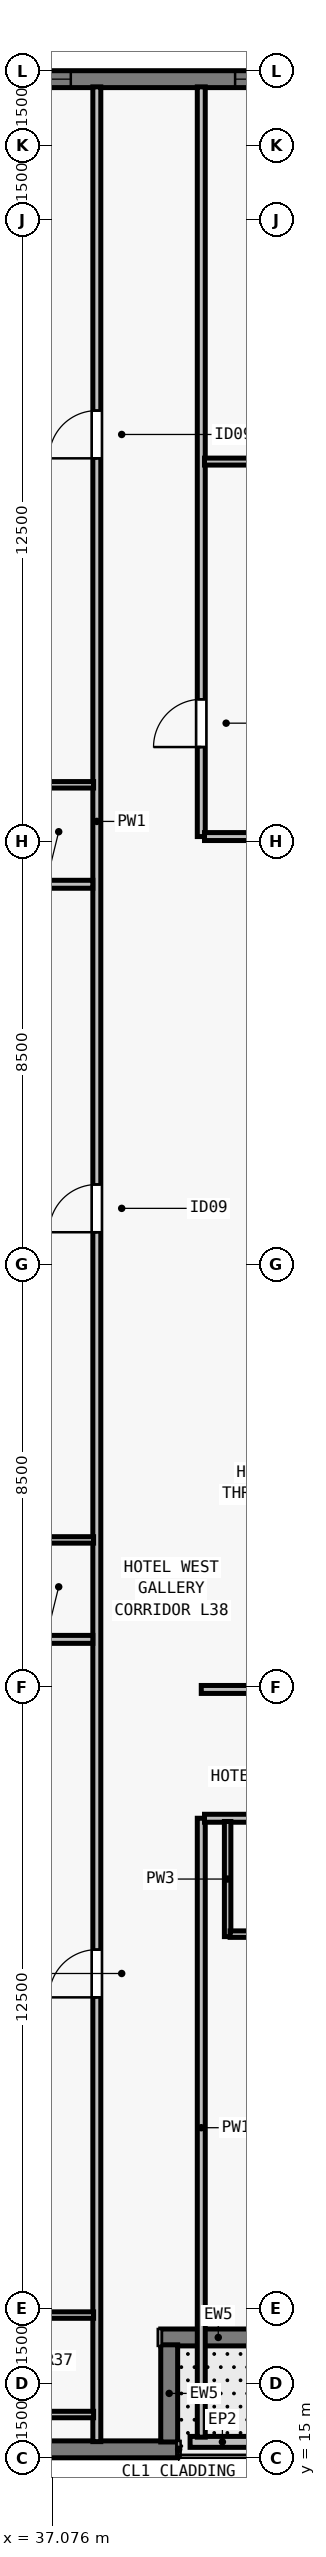
"""IFC4 building model, lengths in metres.
Left out: names, types, materials, properties, quantities, classifications, styles, units other than length and angle.
Written with IfcOpenShell. Run it as: python <this file> out.ifc"""

import sys

from ifc_helpers import new_model, si_unit, direction, frame, frame_2d, origin, place, context, subcontext, project, spatial, rectangle, extrude, element, fill, save


model = new_model("IFC4")
c1 = context("Model", 3, precision=1e-05, world=origin(), true_north=direction((0.0, 1.0)))
c2 = subcontext(c1, "Body", "Model", "MODEL_VIEW")
j1 = project(units=[si_unit("LENGTHUNIT", "METRE"), si_unit("PLANEANGLEUNIT", "RADIAN")], contexts=[c1])
p1 = place(None, origin())
s1 = spatial("IfcSite", under=j1, at=p1, CompositionType="ELEMENT")
p2 = place(p1, origin())
s2 = spatial("IfcBuilding", under=s1, at=p2, CompositionType="ELEMENT")
p3 = place(p2, frame((0.0, 0.0, 141.0)))
s3 = spatial("IfcBuildingStorey", under=s2, at=p3, CompositionType="ELEMENT", Elevation=141.0)
p4 = place(p3, frame((39.6, 15.17, 0.0), z_axis=(0.0, 0.0, 1.0), x_axis=(-1.0, 0.0, 0.0)))
e1 = element("IfcWall", 1, at=p4, inside=s3, PredefinedType="SOLIDWALL", context=c2, shape_type="SweptSolid", body=[
    extrude(rectangle(XDim=7.282, YDim=0.34, at=frame_2d((3.641, 0.0))), origin(), (0.0, 0.0, 1.0), 3.28),
])
p5 = place(p3, frame((32.0, 62.83, 0.0), z_axis=(0.0, 0.0, 1.0), x_axis=(1.0, 0.0, 0.0)))
e2 = element("IfcWall", 2, at=p5, inside=s3, PredefinedType="SOLIDWALL", context=c2, shape_type="SweptSolid", body=[
    extrude(rectangle(XDim=39.682, YDim=0.34, at=frame_2d((19.841, 0.0))), origin(), (0.0, 0.0, 1.0), 3.28),
])
p6 = place(p5, frame((4.102, 0.0, 0.8)))
e3 = element("IfcOpeningElement", 3, at=p6, cuts=e2, PredefinedType="OPENING", context=c2, shape_type="SweptSolid", body=[
    extrude(rectangle(XDim=1.35, YDim=1.66, at=frame_2d((0.675, 0.83))), frame((0.0, 0.18, 0.0), z_axis=(0.0, -1.0, 0.0), x_axis=(1.0, 0.0, 0.0)), (0.0, 0.0, 1.0), 0.36),
])
p7 = place(p5, frame((8.755, 0.0, 0.8)))
e4 = element("IfcOpeningElement", 4, at=p7, cuts=e2, PredefinedType="OPENING", context=c2, shape_type="SweptSolid", body=[
    extrude(rectangle(XDim=1.75, YDim=1.66, at=frame_2d((0.875, 0.83))), frame((0.0, 0.18, 0.0), z_axis=(0.0, -1.0, 0.0), x_axis=(1.0, 0.0, 0.0)), (0.0, 0.0, 1.0), 0.36),
])
p8 = place(p5, frame((12.059, 0.0, 0.8)))
e5 = element("IfcOpeningElement", 5, at=p8, cuts=e2, PredefinedType="OPENING", context=c2, shape_type="SweptSolid", body=[
    extrude(rectangle(XDim=1.35, YDim=1.66, at=frame_2d((0.675, 0.83))), frame((0.0, 0.18, 0.0), z_axis=(0.0, -1.0, 0.0), x_axis=(1.0, 0.0, 0.0)), (0.0, 0.0, 1.0), 0.36),
])
p9 = place(p5, frame((16.262, 0.0, 0.8)))
e6 = element("IfcOpeningElement", 6, at=p9, cuts=e2, PredefinedType="OPENING", context=c2, shape_type="SweptSolid", body=[
    extrude(rectangle(XDim=1.75, YDim=1.66, at=frame_2d((0.875, 0.83))), frame((0.0, 0.18, 0.0), z_axis=(0.0, -1.0, 0.0), x_axis=(1.0, 0.0, 0.0)), (0.0, 0.0, 1.0), 0.36),
])
p10 = place(p5, frame((18.316, 0.0, 0.8)))
e7 = element("IfcOpeningElement", 7, at=p10, cuts=e2, PredefinedType="OPENING", context=c2, shape_type="SweptSolid", body=[
    extrude(rectangle(XDim=1.35, YDim=1.66, at=frame_2d((0.675, 0.83))), frame((0.0, 0.18, 0.0), z_axis=(0.0, -1.0, 0.0), x_axis=(1.0, 0.0, 0.0)), (0.0, 0.0, 1.0), 0.36),
])
p11 = place(p5, frame((22.07, 0.0, 0.8)))
e8 = element("IfcOpeningElement", 8, at=p11, cuts=e2, PredefinedType="OPENING", context=c2, shape_type="SweptSolid", body=[
    extrude(rectangle(XDim=1.75, YDim=1.66, at=frame_2d((0.875, 0.83))), frame((0.0, 0.18, 0.0), z_axis=(0.0, -1.0, 0.0), x_axis=(1.0, 0.0, 0.0)), (0.0, 0.0, 1.0), 0.36),
])
p12 = place(p5, frame((26.273, 0.0, 0.8)))
e9 = element("IfcOpeningElement", 9, at=p12, cuts=e2, PredefinedType="OPENING", context=c2, shape_type="SweptSolid", body=[
    extrude(rectangle(XDim=1.35, YDim=1.66, at=frame_2d((0.675, 0.83))), frame((0.0, 0.18, 0.0), z_axis=(0.0, -1.0, 0.0), x_axis=(1.0, 0.0, 0.0)), (0.0, 0.0, 1.0), 0.36),
])
p13 = place(p5, frame((33.38, 0.0, 0.8)))
e10 = element("IfcOpeningElement", 10, at=p13, cuts=e2, PredefinedType="OPENING", context=c2, shape_type="SweptSolid", body=[
    extrude(rectangle(XDim=1.35, YDim=1.66, at=frame_2d((0.675, 0.83))), frame((0.0, 0.18, 0.0), z_axis=(0.0, -1.0, 0.0), x_axis=(1.0, 0.0, 0.0)), (0.0, 0.0, 1.0), 0.36),
])
p14 = place(p3, frame((45.022, 17.42, 0.0), z_axis=(0.0, 0.0, 1.0), x_axis=(-1.0, 0.0, 0.0)))
e11 = element("IfcWall", 11, at=p14, inside=s3, PredefinedType="SOLIDWALL", context=c2, shape_type="SweptSolid", body=[
    extrude(rectangle(XDim=5.762, YDim=0.34, at=frame_2d((2.881, 0.0))), origin(), (0.0, 0.0, 1.0), 3.28),
])
p15 = place(p14, frame((2.299, 0.0, 0.0)))
e12 = element("IfcOpeningElement", 12, at=p15, cuts=e11, PredefinedType="OPENING", context=c2, shape_type="SweptSolid", body=[
    extrude(rectangle(XDim=1.0, YDim=2.15, at=frame_2d((0.5, 1.075))), frame((0.0, 0.18, 0.0), z_axis=(0.0, -1.0, 0.0), x_axis=(1.0, 0.0, 0.0)), (0.0, 0.0, 1.0), 0.36),
])
p16 = place(p3, frame((39.43, 17.272, 0.0), z_axis=(0.0, 0.0, 1.0), x_axis=(0.0, -1.0, 0.0)))
e13 = element("IfcWall", 13, at=p16, inside=s3, PredefinedType="SOLIDWALL", context=c2, shape_type="SweptSolid", body=[
    extrude(rectangle(XDim=1.954, YDim=0.34, at=frame_2d((0.977, 0.0))), origin(), (0.0, 0.0, 1.0), 3.28),
])
p17 = place(p3, frame((39.85, 15.32, 0.0), z_axis=(0.0, 0.0, 1.0), x_axis=(1.0, 0.0, 0.0)))
e14 = element("IfcWall", 14, at=p17, inside=s3, PredefinedType="PARAPET", context=c2, shape_type="SweptSolid", body=[
    extrude(rectangle(XDim=1.3, YDim=0.22, at=frame_2d((0.65, 0.0))), origin(), (0.0, 0.0, 1.0), 0.55),
])
p18 = place(p3, frame((37.975, 15.325, 0.0), z_axis=(0.0, 0.0, 1.0), x_axis=(0.0, 1.0, 0.0)))
e15 = element("IfcWall", 15, at=p18, inside=s3, PredefinedType="PARTITIONING", context=c2, shape_type="SweptSolid", body=[
    extrude(rectangle(XDim=47.35, YDim=0.16, at=frame_2d((23.675, 0.0))), origin(), (0.0, 0.0, 1.0), 2.555),
])
p19 = place(p18, frame((8.934, 0.0, 0.0)))
e16 = element("IfcOpeningElement", 16, at=p19, cuts=e15, PredefinedType="OPENING", context=c2, shape_type="SweptSolid", body=[
    extrude(rectangle(XDim=0.96, YDim=2.15, at=frame_2d((0.48, 1.075))), frame((0.0, 0.09, 0.0), z_axis=(0.0, -1.0, 0.0), x_axis=(1.0, 0.0, 0.0)), (0.0, 0.0, 1.0), 0.18),
])
p20 = place(p18, frame((24.319, 0.0, 0.0)))
e17 = element("IfcOpeningElement", 17, at=p20, cuts=e15, PredefinedType="OPENING", context=c2, shape_type="SweptSolid", body=[
    extrude(rectangle(XDim=0.96, YDim=2.15, at=frame_2d((0.48, 1.075))), frame((0.0, 0.09, 0.0), z_axis=(0.0, -1.0, 0.0), x_axis=(1.0, 0.0, 0.0)), (0.0, 0.0, 1.0), 0.18),
])
p21 = place(p18, frame((39.88, 0.0, 0.0)))
e18 = element("IfcOpeningElement", 18, at=p21, cuts=e15, PredefinedType="OPENING", context=c2, shape_type="SweptSolid", body=[
    extrude(rectangle(XDim=0.96, YDim=2.15, at=frame_2d((0.48, 1.075))), frame((0.0, 0.09, 0.0), z_axis=(0.0, -1.0, 0.0), x_axis=(1.0, 0.0, 0.0)), (0.0, 0.0, 1.0), 0.18),
])
p22 = place(p3, frame((40.075, 15.415, 0.0), z_axis=(0.0, 0.0, 1.0), x_axis=(0.0, 1.0, 0.0)))
e19 = element("IfcWall", 19, at=p22, inside=s3, PredefinedType="PARTITIONING", context=c2, shape_type="SweptSolid", body=[
    extrude(rectangle(XDim=12.445, YDim=0.16, at=frame_2d((6.223, 0.0))), origin(), (0.0, 0.0, 1.0), 2.555),
])
p23 = place(p3, frame((40.075, 47.6, 0.0), z_axis=(0.0, 0.0, 1.0), x_axis=(0.0, 1.0, 0.0)))
e20 = element("IfcWall", 20, at=p23, inside=s3, PredefinedType="PARTITIONING", context=c2, shape_type="SweptSolid", body=[
    extrude(rectangle(XDim=15.075, YDim=0.16, at=frame_2d((7.538, 0.0))), origin(), (0.0, 0.0, 1.0), 2.555),
])
p24 = place(p23, frame((1.8, 0.0, 0.0)))
e21 = element("IfcOpeningElement", 21, at=p24, cuts=e20, PredefinedType="OPENING", context=c2, shape_type="SweptSolid", body=[
    extrude(rectangle(XDim=0.96, YDim=2.12, at=frame_2d((0.48, 1.06))), frame((0.0, 0.09, 0.0), z_axis=(0.0, -1.0, 0.0), x_axis=(1.0, 0.0, 0.0)), (0.0, 0.0, 1.0), 0.18),
])
p25 = place(p3, frame((40.075, 30.45, 0.0), z_axis=(0.0, 0.0, 1.0), x_axis=(1.0, 0.0, 0.0)))
e22 = element("IfcWall", 22, at=p25, inside=s3, PredefinedType="PARTITIONING", context=c2, shape_type="SweptSolid", body=[
    extrude(rectangle(XDim=3.16, YDim=0.16, at=frame_2d((1.58, 0.0))), origin(), (0.0, 0.0, 1.0), 3.28),
])
p26 = place(p3, frame((40.14, 47.6, 0.0), z_axis=(0.0, 0.0, 1.0), x_axis=(1.0, 0.0, 0.0)))
e23 = element("IfcWall", 23, at=p26, inside=s3, PredefinedType="PARTITIONING", context=c2, shape_type="SweptSolid", body=[
    extrude(rectangle(XDim=3.095, YDim=0.16, at=frame_2d((1.548, 0.0))), origin(), (0.0, 0.0, 1.0), 3.28),
])
p27 = place(p3, frame((40.14, 27.86, 0.0), z_axis=(0.0, 0.0, 1.0), x_axis=(1.0, 0.0, 0.0)))
e24 = element("IfcWall", 24, at=p27, inside=s3, PredefinedType="PARTITIONING", context=c2, shape_type="SweptSolid", body=[
    extrude(rectangle(XDim=22.07, YDim=0.16, at=frame_2d((11.035, 0.0))), origin(), (0.0, 0.0, 1.0), 3.28),
])
p28 = place(p27, frame((3.834, 0.0, 0.0)))
e25 = element("IfcOpeningElement", 25, at=p28, cuts=e24, PredefinedType="OPENING", context=c2, shape_type="SweptSolid", body=[
    extrude(rectangle(XDim=0.96, YDim=2.15, at=frame_2d((0.48, 1.075))), frame((0.0, 0.09, 0.0), z_axis=(0.0, -1.0, 0.0), x_axis=(1.0, 0.0, 0.0)), (0.0, 0.0, 1.0), 0.18),
])
p29 = place(p27, frame((8.746, 0.0, 0.0)))
e26 = element("IfcOpeningElement", 26, at=p29, cuts=e24, PredefinedType="OPENING", context=c2, shape_type="SweptSolid", body=[
    extrude(rectangle(XDim=0.96, YDim=2.15, at=frame_2d((0.48, 1.075))), frame((0.0, 0.09, 0.0), z_axis=(0.0, -1.0, 0.0), x_axis=(1.0, 0.0, 0.0)), (0.0, 0.0, 1.0), 0.18),
])
p30 = place(p27, frame((14.46, 0.0, 0.0)))
e27 = element("IfcOpeningElement", 27, at=p30, cuts=e24, PredefinedType="OPENING", context=c2, shape_type="SweptSolid", body=[
    extrude(rectangle(XDim=0.96, YDim=2.15, at=frame_2d((0.48, 1.075))), frame((0.0, 0.09, 0.0), z_axis=(0.0, -1.0, 0.0), x_axis=(1.0, 0.0, 0.0)), (0.0, 0.0, 1.0), 0.18),
])
p31 = place(p27, frame((19.993, 0.0, 0.0)))
e28 = element("IfcOpeningElement", 28, at=p31, cuts=e24, PredefinedType="OPENING", context=c2, shape_type="SweptSolid", body=[
    extrude(rectangle(XDim=0.96, YDim=2.15, at=frame_2d((0.48, 1.075))), frame((0.0, 0.09, 0.0), z_axis=(0.0, -1.0, 0.0), x_axis=(1.0, 0.0, 0.0)), (0.0, 0.0, 1.0), 0.18),
])
p32 = place(p3, frame((40.14, 55.14, 0.0), z_axis=(0.0, 0.0, 1.0), x_axis=(1.0, 0.0, 0.0)))
e29 = element("IfcWall", 29, at=p32, inside=s3, PredefinedType="PARTITIONING", context=c2, shape_type="SweptSolid", body=[
    extrude(rectangle(XDim=22.07, YDim=0.14, at=frame_2d((11.035, 0.0))), origin(), (0.0, 0.0, 1.0), 3.28),
])
p33 = place(p32, frame((3.435, 0.0, 0.0)))
e30 = element("IfcOpeningElement", 30, at=p33, cuts=e29, PredefinedType="OPENING", context=c2, shape_type="SweptSolid", body=[
    extrude(rectangle(XDim=0.92, YDim=2.12, at=frame_2d((0.46, 1.06))), frame((0.0, 0.08, 0.0), z_axis=(0.0, -1.0, 0.0), x_axis=(1.0, 0.0, 0.0)), (0.0, 0.0, 1.0), 0.16),
])
p34 = place(p32, frame((14.435, 0.0, 0.0)))
e31 = element("IfcOpeningElement", 31, at=p34, cuts=e29, PredefinedType="OPENING", context=c2, shape_type="SweptSolid", body=[
    extrude(rectangle(XDim=0.92, YDim=2.12, at=frame_2d((0.46, 1.06))), frame((0.0, 0.08, 0.0), z_axis=(0.0, -1.0, 0.0), x_axis=(1.0, 0.0, 0.0)), (0.0, 0.0, 1.0), 0.16),
])
p35 = place(p3, frame((40.605, 25.48, 0.0), z_axis=(0.0, 0.0, 1.0), x_axis=(0.0, 1.0, 0.0)))
e32 = element("IfcWall", 32, at=p35, inside=s3, PredefinedType="PLUMBINGWALL", context=c2, shape_type="SweptSolid", body=[
    extrude(rectangle(XDim=2.315, YDim=0.13, at=frame_2d((1.157, 0.0))), origin(), (0.0, 0.0, 1.0), 2.555),
])
p36 = place(p3, frame((40.655, 25.53, 0.0), z_axis=(0.0, 0.0, 1.0), x_axis=(1.0, 0.0, 0.0)))
e33 = element("IfcWall", 33, at=p36, inside=s3, PredefinedType="PLUMBINGWALL", context=c2, shape_type="SweptSolid", body=[
    extrude(rectangle(XDim=1.9, YDim=0.13, at=frame_2d((0.95, 0.0))), origin(), (0.0, 0.0, 1.0), 3.28),
])
p37 = place(p36, frame((0.54, 0.0, 0.0)))
e34 = element("IfcOpeningElement", 34, at=p37, cuts=e33, PredefinedType="OPENING", context=c2, shape_type="SweptSolid", body=[
    extrude(rectangle(XDim=0.82, YDim=2.1, at=frame_2d((0.41, 1.05))), frame((0.0, 0.075, 0.0), z_axis=(0.0, -1.0, 0.0), x_axis=(1.0, 0.0, 0.0)), (0.0, 0.0, 1.0), 0.15),
])
for number, where, z_axis, x_axis in (
    (35, (35.595, 15.87, 0.0), (0.0, 0.0, 1.0), (1.0, 0.0, 0.0)),
    (36, (35.595, 17.87, 0.0), (0.0, 0.0, 1.0), (1.0, 0.0, 0.0)),
):
    element("IfcWall", number, at=place(p3, frame(where, z_axis=z_axis, x_axis=x_axis)), inside=s3, PredefinedType="PLUMBINGWALL", context=c2, shape_type="SweptSolid", body=[
        extrude(rectangle(XDim=2.315, YDim=0.13, at=frame_2d((1.157, 0.0))), origin(), (0.0, 0.0, 1.0), 3.28),
    ])
p38 = place(p3, frame((28.325, 31.457, 0.0), z_axis=(0.0, 0.0, 1.0), x_axis=(1.0, 0.0, 0.0)))
e37 = element("IfcWall", 37, at=p38, inside=s3, PredefinedType="PARTITIONING", context=c2, shape_type="SweptSolid", body=[
    extrude(rectangle(XDim=9.57, YDim=0.16, at=frame_2d((4.785, 0.0))), origin(), (0.0, 0.0, 1.0), 3.28),
])
p39 = place(p3, frame((35.595, 33.457, 0.0), z_axis=(0.0, 0.0, 1.0), x_axis=(1.0, 0.0, 0.0)))
e38 = element("IfcWall", 38, at=p39, inside=s3, PredefinedType="PLUMBINGWALL", context=c2, shape_type="SweptSolid", body=[
    extrude(rectangle(XDim=2.315, YDim=0.13, at=frame_2d((1.157, 0.0))), origin(), (0.0, 0.0, 1.0), 3.28),
])
p40 = place(p3, frame((28.325, 46.641, 0.0), z_axis=(0.0, 0.0, 1.0), x_axis=(1.0, 0.0, 0.0)))
e39 = element("IfcWall", 39, at=p40, inside=s3, PredefinedType="PARTITIONING", context=c2, shape_type="SweptSolid", body=[
    extrude(rectangle(XDim=9.57, YDim=0.16, at=frame_2d((4.785, 0.0))), origin(), (0.0, 0.0, 1.0), 3.28),
])
p41 = place(p3, frame((35.595, 48.641, 0.0), z_axis=(0.0, 0.0, 1.0), x_axis=(1.0, 0.0, 0.0)))
e40 = element("IfcWall", 40, at=p41, inside=s3, PredefinedType="PLUMBINGWALL", context=c2, shape_type="SweptSolid", body=[
    extrude(rectangle(XDim=2.315, YDim=0.13, at=frame_2d((1.157, 0.0))), origin(), (0.0, 0.0, 1.0), 3.28),
])
p42 = place(p6, origin())
e41 = element("IfcWindow", 41, at=p42, inside=s3, PartitioningType="SINGLE_PANEL", PredefinedType="WINDOW", context=c2, shape_type="SweptSolid", body=[
    extrude(rectangle(XDim=1.35, YDim=1.66, at=frame_2d((0.675, 0.83))), frame((0.0, -0.05, 0.0), z_axis=(0.0, -1.0, 0.0), x_axis=(1.0, 0.0, 0.0)), (0.0, 0.0, 1.0), 0.06),
])
fill(e3, e41)
p43 = place(p7, origin())
e42 = element("IfcWindow", 42, at=p43, inside=s3, PartitioningType="SINGLE_PANEL", PredefinedType="WINDOW", context=c2, shape_type="SweptSolid", body=[
    extrude(rectangle(XDim=1.75, YDim=1.66, at=frame_2d((0.875, 0.83))), frame((0.0, -0.05, 0.0), z_axis=(0.0, -1.0, 0.0), x_axis=(1.0, 0.0, 0.0)), (0.0, 0.0, 1.0), 0.06),
])
fill(e4, e42)
p44 = place(p24, origin())
e43 = element("IfcDoor", 43, at=p44, inside=s3, OperationType="SINGLE_SWING_LEFT", PredefinedType="DOOR", context=c2, shape_type="SweptSolid", body=[
    extrude(rectangle(XDim=0.96, YDim=2.12, at=frame_2d((0.48, 1.06))), frame((0.0, 0.025, 0.0), z_axis=(0.0, -1.0, 0.0), x_axis=(1.0, 0.0, 0.0)), (0.0, 0.0, 1.0), 0.05),
])
fill(e21, e43)
p45 = place(p19, origin())
e44 = element("IfcDoor", 44, at=p45, inside=s3, OperationType="SINGLE_SWING_LEFT", PredefinedType="DOOR", context=c2, shape_type="SweptSolid", body=[
    extrude(rectangle(XDim=0.96, YDim=2.15, at=frame_2d((0.48, 1.075))), frame((0.0, 0.025, 0.0), z_axis=(0.0, -1.0, 0.0), x_axis=(1.0, 0.0, 0.0)), (0.0, 0.0, 1.0), 0.05),
])
fill(e16, e44)
p46 = place(p20, origin())
e45 = element("IfcDoor", 45, at=p46, inside=s3, OperationType="SINGLE_SWING_LEFT", PredefinedType="DOOR", context=c2, shape_type="SweptSolid", body=[
    extrude(rectangle(XDim=0.96, YDim=2.15, at=frame_2d((0.48, 1.075))), frame((0.0, 0.025, 0.0), z_axis=(0.0, -1.0, 0.0), x_axis=(1.0, 0.0, 0.0)), (0.0, 0.0, 1.0), 0.05),
])
fill(e17, e45)
p47 = place(p21, origin())
e46 = element("IfcDoor", 46, at=p47, inside=s3, OperationType="SINGLE_SWING_LEFT", PredefinedType="DOOR", context=c2, shape_type="SweptSolid", body=[
    extrude(rectangle(XDim=0.96, YDim=2.15, at=frame_2d((0.48, 1.075))), frame((0.0, 0.025, 0.0), z_axis=(0.0, -1.0, 0.0), x_axis=(1.0, 0.0, 0.0)), (0.0, 0.0, 1.0), 0.05),
])
fill(e18, e46)
save(model, sys.argv[1])
